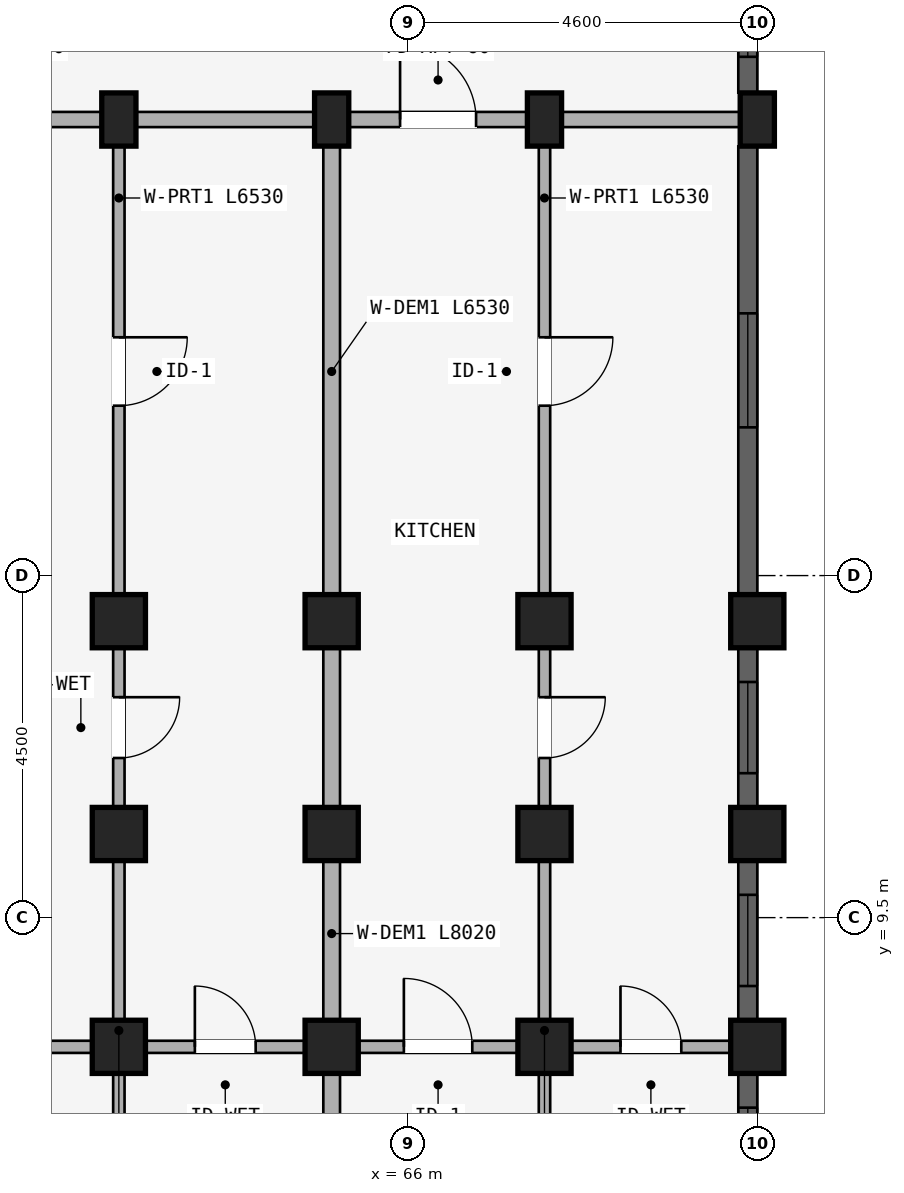
"""IFC4 building model, lengths in metres.
Left out: names, types, materials, properties, quantities, classifications, styles, units other than length and angle.
Written with IfcOpenShell. Run it as: python <this file> out.ifc"""

import sys

from ifc_helpers import new_model, si_unit, direction, frame, frame_2d, origin, origin_2d, place, context, subcontext, project, spatial, rectangle, extrude, element, fill, save


model = new_model("IFC4")
c1 = context("Model", 3, precision=1e-05, world=origin(), true_north=direction((0.0, 1.0)))
c2 = subcontext(c1, "Body", "Model", "MODEL_VIEW")
j1 = project(units=[si_unit("LENGTHUNIT", "METRE"), si_unit("PLANEANGLEUNIT", "RADIAN")], contexts=[c1])
p1 = place(None, origin())
s1 = spatial("IfcSite", under=j1, at=p1, CompositionType="ELEMENT")
p2 = place(p1, origin())
s2 = spatial("IfcBuilding", under=s1, at=p2, CompositionType="ELEMENT")
p3 = place(p2, frame((0.0, 0.0, 21.3)))
s3 = spatial("IfcBuildingStorey", under=s2, at=p3, CompositionType="ELEMENT", Elevation=21.3)
p4 = place(p3, frame((62.2, 20.0, 0.0), z_axis=(0.0, 0.0, 1.0), x_axis=(1.0, 0.0, 0.0)))
e1 = element("IfcColumn", 1, at=p4, inside=s3, PredefinedType="COLUMN", context=c2, shape_type="SweptSolid", body=[
    extrude(rectangle(XDim=0.45, YDim=0.7, at=origin_2d()), origin(), (0.0, 0.0, 1.0), 2.93),
])
for number, where, z_axis, x_axis in (
    (2, (62.2, 13.4, 0.0), (0.0, 0.0, 1.0), (1.0, 0.0, 0.0)),
    (3, (62.2, 10.6, 0.0), (0.0, 0.0, 1.0), (1.0, 0.0, 0.0)),
    (4, (62.2, 7.8, 0.0), (0.0, 0.0, 1.0), (1.0, 0.0, 0.0)),
):
    element("IfcColumn", number, at=place(p3, frame(where, z_axis=z_axis, x_axis=x_axis)), inside=s3, PredefinedType="COLUMN", context=c2, shape_type="SweptSolid", body=[
        extrude(rectangle(XDim=0.7, YDim=0.7, at=origin_2d()), origin(), (0.0, 0.0, 1.0), 2.93),
    ])
p5 = place(p3, frame((65.0, 20.0, 0.0), z_axis=(0.0, 0.0, 1.0), x_axis=(1.0, 0.0, 0.0)))
e5 = element("IfcColumn", 5, at=p5, inside=s3, PredefinedType="COLUMN", context=c2, shape_type="SweptSolid", body=[
    extrude(rectangle(XDim=0.45, YDim=0.7, at=origin_2d()), origin(), (0.0, 0.0, 1.0), 2.93),
])
for number, where, z_axis, x_axis in (
    (6, (65.0, 13.4, 0.0), (0.0, 0.0, 1.0), (1.0, 0.0, 0.0)),
    (7, (65.0, 10.6, 0.0), (0.0, 0.0, 1.0), (1.0, 0.0, 0.0)),
    (8, (65.0, 7.8, 0.0), (0.0, 0.0, 1.0), (1.0, 0.0, 0.0)),
):
    element("IfcColumn", number, at=place(p3, frame(where, z_axis=z_axis, x_axis=x_axis)), inside=s3, PredefinedType="COLUMN", context=c2, shape_type="SweptSolid", body=[
        extrude(rectangle(XDim=0.7, YDim=0.7, at=origin_2d()), origin(), (0.0, 0.0, 1.0), 2.93),
    ])
p6 = place(p3, frame((67.8, 20.0, 0.0), z_axis=(0.0, 0.0, 1.0), x_axis=(1.0, 0.0, 0.0)))
e9 = element("IfcColumn", 9, at=p6, inside=s3, PredefinedType="COLUMN", context=c2, shape_type="SweptSolid", body=[
    extrude(rectangle(XDim=0.45, YDim=0.7, at=origin_2d()), origin(), (0.0, 0.0, 1.0), 2.93),
])
for number, where, z_axis, x_axis in (
    (10, (67.8, 13.4, 0.0), (0.0, 0.0, 1.0), (1.0, 0.0, 0.0)),
    (11, (67.8, 10.6, 0.0), (0.0, 0.0, 1.0), (1.0, 0.0, 0.0)),
    (12, (67.8, 7.8, 0.0), (0.0, 0.0, 1.0), (1.0, 0.0, 0.0)),
):
    element("IfcColumn", number, at=place(p3, frame(where, z_axis=z_axis, x_axis=x_axis)), inside=s3, PredefinedType="COLUMN", context=c2, shape_type="SweptSolid", body=[
        extrude(rectangle(XDim=0.7, YDim=0.7, at=origin_2d()), origin(), (0.0, 0.0, 1.0), 2.93),
    ])
p7 = place(p3, frame((70.6, 20.0, 0.0), z_axis=(0.0, 0.0, 1.0), x_axis=(1.0, 0.0, 0.0)))
e13 = element("IfcColumn", 13, at=p7, inside=s3, PredefinedType="COLUMN", context=c2, shape_type="SweptSolid", body=[
    extrude(rectangle(XDim=0.45, YDim=0.7, at=origin_2d()), origin(), (0.0, 0.0, 1.0), 2.93),
])
for number, where, z_axis, x_axis in (
    (14, (70.6, 13.4, 0.0), (0.0, 0.0, 1.0), (1.0, 0.0, 0.0)),
    (15, (70.6, 10.6, 0.0), (0.0, 0.0, 1.0), (1.0, 0.0, 0.0)),
    (16, (70.6, 7.8, 0.0), (0.0, 0.0, 1.0), (1.0, 0.0, 0.0)),
):
    element("IfcColumn", number, at=place(p3, frame(where, z_axis=z_axis, x_axis=x_axis)), inside=s3, PredefinedType="COLUMN", context=c2, shape_type="SweptSolid", body=[
        extrude(rectangle(XDim=0.7, YDim=0.7, at=origin_2d()), origin(), (0.0, 0.0, 1.0), 2.93),
    ])
p8 = place(p3, frame((59.4, 20.0, 0.0), z_axis=(0.0, 0.0, 1.0), x_axis=(1.0, 0.0, 0.0)))
e17 = element("IfcWall", 17, at=p8, inside=s3, PredefinedType="STANDARD", context=c2, shape_type="SweptSolid", body=[
    extrude(rectangle(XDim=2.8, YDim=0.2, at=frame_2d((1.4, 0.0))), origin(), (0.0, 0.0, 1.0), 2.372),
])
p9 = place(p8, frame((0.9, 0.0, 0.0)))
e18 = element("IfcOpeningElement", 18, at=p9, cuts=e17, PredefinedType="OPENING", context=c2, shape_type="SweptSolid", body=[
    extrude(rectangle(XDim=1.0, YDim=2.15, at=frame_2d((0.5, 1.075))), frame((0.0, 0.11, 0.0), z_axis=(0.0, -1.0, 0.0), x_axis=(1.0, 0.0, 0.0)), (0.0, 0.0, 1.0), 0.22),
])
p10 = place(p3, frame((59.48, 7.8, 0.0), z_axis=(0.0, 0.0, 1.0), x_axis=(1.0, 0.0, 0.0)))
e19 = element("IfcWall", 19, at=p10, inside=s3, PredefinedType="PLUMBINGWALL", context=c2, shape_type="SweptSolid", body=[
    extrude(rectangle(XDim=2.64, YDim=0.16, at=frame_2d((1.32, 0.0))), origin(), (0.0, 0.0, 1.0), 2.372),
])
p11 = place(p10, frame((0.87, 0.0, 0.0)))
e20 = element("IfcOpeningElement", 20, at=p11, cuts=e19, PredefinedType="OPENING", context=c2, shape_type="SweptSolid", body=[
    extrude(rectangle(XDim=0.9, YDim=2.1, at=frame_2d((0.45, 1.05))), frame((0.0, 0.09, 0.0), z_axis=(0.0, -1.0, 0.0), x_axis=(1.0, 0.0, 0.0)), (0.0, 0.0, 1.0), 0.18),
])
p12 = place(p3, frame((62.2, 20.0, 0.0), z_axis=(0.0, 0.0, 1.0), x_axis=(1.0, 0.0, 0.0)))
e21 = element("IfcWall", 21, at=p12, inside=s3, PredefinedType="STANDARD", context=c2, shape_type="SweptSolid", body=[
    extrude(rectangle(XDim=2.8, YDim=0.2, at=frame_2d((1.4, 0.0))), origin(), (0.0, 0.0, 1.0), 2.372),
])
p13 = place(p3, frame((62.28, 7.8, 0.0), z_axis=(0.0, 0.0, 1.0), x_axis=(1.0, 0.0, 0.0)))
e22 = element("IfcWall", 22, at=p13, inside=s3, PredefinedType="PLUMBINGWALL", context=c2, shape_type="SweptSolid", body=[
    extrude(rectangle(XDim=2.64, YDim=0.16, at=frame_2d((1.32, 0.0))), origin(), (0.0, 0.0, 1.0), 2.372),
])
p14 = place(p13, frame((0.92, 0.0, 0.0)))
e23 = element("IfcOpeningElement", 23, at=p14, cuts=e22, PredefinedType="OPENING", context=c2, shape_type="SweptSolid", body=[
    extrude(rectangle(XDim=0.8, YDim=2.1, at=frame_2d((0.4, 1.05))), frame((0.0, 0.09, 0.0), z_axis=(0.0, -1.0, 0.0), x_axis=(1.0, 0.0, 0.0)), (0.0, 0.0, 1.0), 0.18),
])
p15 = place(p3, frame((65.0, 20.0, 0.0), z_axis=(0.0, 0.0, 1.0), x_axis=(1.0, 0.0, 0.0)))
e24 = element("IfcWall", 24, at=p15, inside=s3, PredefinedType="STANDARD", context=c2, shape_type="SweptSolid", body=[
    extrude(rectangle(XDim=2.8, YDim=0.2, at=frame_2d((1.4, 0.0))), origin(), (0.0, 0.0, 1.0), 2.372),
])
p16 = place(p15, frame((0.9, 0.0, 0.0)))
e25 = element("IfcOpeningElement", 25, at=p16, cuts=e24, PredefinedType="OPENING", context=c2, shape_type="SweptSolid", body=[
    extrude(rectangle(XDim=1.0, YDim=2.15, at=frame_2d((0.5, 1.075))), frame((0.0, 0.11, 0.0), z_axis=(0.0, -1.0, 0.0), x_axis=(1.0, 0.0, 0.0)), (0.0, 0.0, 1.0), 0.22),
])
p17 = place(p3, frame((65.08, 7.8, 0.0), z_axis=(0.0, 0.0, 1.0), x_axis=(1.0, 0.0, 0.0)))
e26 = element("IfcWall", 26, at=p17, inside=s3, PredefinedType="PLUMBINGWALL", context=c2, shape_type="SweptSolid", body=[
    extrude(rectangle(XDim=2.64, YDim=0.16, at=frame_2d((1.32, 0.0))), origin(), (0.0, 0.0, 1.0), 2.372),
])
p18 = place(p17, frame((0.87, 0.0, 0.0)))
e27 = element("IfcOpeningElement", 27, at=p18, cuts=e26, PredefinedType="OPENING", context=c2, shape_type="SweptSolid", body=[
    extrude(rectangle(XDim=0.9, YDim=2.1, at=frame_2d((0.45, 1.05))), frame((0.0, 0.09, 0.0), z_axis=(0.0, -1.0, 0.0), x_axis=(1.0, 0.0, 0.0)), (0.0, 0.0, 1.0), 0.18),
])
p19 = place(p3, frame((67.8, 20.0, 0.0), z_axis=(0.0, 0.0, 1.0), x_axis=(1.0, 0.0, 0.0)))
e28 = element("IfcWall", 28, at=p19, inside=s3, PredefinedType="STANDARD", context=c2, shape_type="SweptSolid", body=[
    extrude(rectangle(XDim=2.8, YDim=0.2, at=frame_2d((1.4, 0.0))), origin(), (0.0, 0.0, 1.0), 2.372),
])
p20 = place(p3, frame((67.88, 7.8, 0.0), z_axis=(0.0, 0.0, 1.0), x_axis=(1.0, 0.0, 0.0)))
e29 = element("IfcWall", 29, at=p20, inside=s3, PredefinedType="PLUMBINGWALL", context=c2, shape_type="SweptSolid", body=[
    extrude(rectangle(XDim=2.64, YDim=0.16, at=frame_2d((1.32, 0.0))), origin(), (0.0, 0.0, 1.0), 2.372),
])
p21 = place(p20, frame((0.92, 0.0, 0.0)))
e30 = element("IfcOpeningElement", 30, at=p21, cuts=e29, PredefinedType="OPENING", context=c2, shape_type="SweptSolid", body=[
    extrude(rectangle(XDim=0.8, YDim=2.1, at=frame_2d((0.4, 1.05))), frame((0.0, 0.09, 0.0), z_axis=(0.0, -1.0, 0.0), x_axis=(1.0, 0.0, 0.0)), (0.0, 0.0, 1.0), 0.18),
])
p22 = place(p3, frame((62.2, 19.95, 0.0), z_axis=(0.0, 0.0, 1.0), x_axis=(0.0, -1.0, 0.0)))
e31 = element("IfcWall", 31, at=p22, inside=s3, PredefinedType="PARTITIONING", context=c2, shape_type="SweptSolid", body=[
    extrude(rectangle(XDim=6.53, YDim=0.15, at=frame_2d((3.265, 0.0))), origin(), (0.0, 0.0, 1.0), 2.372),
])
p23 = place(p22, frame((2.815, 0.0, 0.0)))
e32 = element("IfcOpeningElement", 32, at=p23, cuts=e31, PredefinedType="OPENING", context=c2, shape_type="SweptSolid", body=[
    extrude(rectangle(XDim=0.9, YDim=2.1, at=frame_2d((0.45, 1.05))), frame((0.0, 0.085, 0.0), z_axis=(0.0, -1.0, 0.0), x_axis=(1.0, 0.0, 0.0)), (0.0, 0.0, 1.0), 0.17),
])
p24 = place(p3, frame((62.2, 13.3, 0.0), z_axis=(0.0, 0.0, 1.0), x_axis=(0.0, -1.0, 0.0)))
e33 = element("IfcWall", 33, at=p24, inside=s3, PredefinedType="PARTITIONING", context=c2, shape_type="SweptSolid", body=[
    extrude(rectangle(XDim=8.02, YDim=0.15, at=frame_2d((4.01, 0.0))), origin(), (0.0, 0.0, 1.0), 2.372),
])
p25 = place(p24, frame((0.9, 0.0, 0.0)))
e34 = element("IfcOpeningElement", 34, at=p25, cuts=e33, PredefinedType="OPENING", context=c2, shape_type="SweptSolid", body=[
    extrude(rectangle(XDim=0.8, YDim=2.1, at=frame_2d((0.4, 1.05))), frame((0.0, 0.085, 0.0), z_axis=(0.0, -1.0, 0.0), x_axis=(1.0, 0.0, 0.0)), (0.0, 0.0, 1.0), 0.17),
])
p26 = place(p3, frame((65.0, 19.95, 0.0), z_axis=(0.0, 0.0, 1.0), x_axis=(0.0, -1.0, 0.0)))
e35 = element("IfcWall", 35, at=p26, inside=s3, PredefinedType="STANDARD", context=c2, shape_type="SweptSolid", body=[
    extrude(rectangle(XDim=6.53, YDim=0.22, at=frame_2d((3.265, 0.0))), origin(), (0.0, 0.0, 1.0), 2.372),
])
p27 = place(p3, frame((65.0, 13.3, 0.0), z_axis=(0.0, 0.0, 1.0), x_axis=(0.0, -1.0, 0.0)))
e36 = element("IfcWall", 36, at=p27, inside=s3, PredefinedType="STANDARD", context=c2, shape_type="SweptSolid", body=[
    extrude(rectangle(XDim=8.02, YDim=0.22, at=frame_2d((4.01, 0.0))), origin(), (0.0, 0.0, 1.0), 2.372),
])
p28 = place(p3, frame((67.8, 19.95, 0.0), z_axis=(0.0, 0.0, 1.0), x_axis=(0.0, -1.0, 0.0)))
e37 = element("IfcWall", 37, at=p28, inside=s3, PredefinedType="PARTITIONING", context=c2, shape_type="SweptSolid", body=[
    extrude(rectangle(XDim=6.53, YDim=0.15, at=frame_2d((3.265, 0.0))), origin(), (0.0, 0.0, 1.0), 2.372),
])
p29 = place(p28, frame((2.815, 0.0, 0.0)))
e38 = element("IfcOpeningElement", 38, at=p29, cuts=e37, PredefinedType="OPENING", context=c2, shape_type="SweptSolid", body=[
    extrude(rectangle(XDim=0.9, YDim=2.1, at=frame_2d((0.45, 1.05))), frame((0.0, 0.085, 0.0), z_axis=(0.0, -1.0, 0.0), x_axis=(1.0, 0.0, 0.0)), (0.0, 0.0, 1.0), 0.17),
])
p30 = place(p3, frame((67.8, 13.3, 0.0), z_axis=(0.0, 0.0, 1.0), x_axis=(0.0, -1.0, 0.0)))
e39 = element("IfcWall", 39, at=p30, inside=s3, PredefinedType="PARTITIONING", context=c2, shape_type="SweptSolid", body=[
    extrude(rectangle(XDim=8.02, YDim=0.15, at=frame_2d((4.01, 0.0))), origin(), (0.0, 0.0, 1.0), 2.372),
])
p31 = place(p30, frame((0.9, 0.0, 0.0)))
e40 = element("IfcOpeningElement", 40, at=p31, cuts=e39, PredefinedType="OPENING", context=c2, shape_type="SweptSolid", body=[
    extrude(rectangle(XDim=0.8, YDim=2.1, at=frame_2d((0.4, 1.05))), frame((0.0, 0.085, 0.0), z_axis=(0.0, -1.0, 0.0), x_axis=(1.0, 0.0, 0.0)), (0.0, 0.0, 1.0), 0.17),
])
p32 = place(p3, frame((70.475, 22.046, 0.0), z_axis=(0.0, 0.0, 1.0), x_axis=(0.0, -1.0, 0.0)))
e41 = element("IfcWall", 41, at=p32, inside=s3, PredefinedType="STANDARD", context=c2, shape_type="SweptSolid", body=[
    extrude(rectangle(XDim=1.693, YDim=0.25, at=frame_2d((0.846, 0.0))), origin(), (0.0, 0.0, 1.0), 2.372),
])
p33 = place(p32, frame((0.471, 0.0, 0.88)))
e42 = element("IfcOpeningElement", 42, at=p33, cuts=e41, PredefinedType="OPENING", context=c2, shape_type="SweptSolid", body=[
    extrude(rectangle(XDim=0.75, YDim=1.05, at=frame_2d((0.375, 0.525))), frame((0.0, 0.135, 0.0), z_axis=(0.0, -1.0, 0.0), x_axis=(1.0, 0.0, 0.0)), (0.0, 0.0, 1.0), 0.27),
])
p34 = place(p3, frame((70.475, 19.646, 0.0), z_axis=(0.0, 0.0, 1.0), x_axis=(0.0, -1.0, 0.0)))
e43 = element("IfcWall", 43, at=p34, inside=s3, PredefinedType="STANDARD", context=c2, shape_type="SweptSolid", body=[
    extrude(rectangle(XDim=5.893, YDim=0.25, at=frame_2d((2.947, 0.0))), origin(), (0.0, 0.0, 1.0), 2.372),
])
p35 = place(p34, frame((2.197, 0.0, 0.522)))
e44 = element("IfcOpeningElement", 44, at=p35, cuts=e43, PredefinedType="OPENING", context=c2, shape_type="SweptSolid", body=[
    extrude(rectangle(XDim=1.5, YDim=1.65, at=frame_2d((0.75, 0.825))), frame((0.0, 0.135, 0.0), z_axis=(0.0, -1.0, 0.0), x_axis=(1.0, 0.0, 0.0)), (0.0, 0.0, 1.0), 0.27),
])
p36 = place(p3, frame((70.475, 13.046, 0.0), z_axis=(0.0, 0.0, 1.0), x_axis=(0.0, -1.0, 0.0)))
e45 = element("IfcWall", 45, at=p36, inside=s3, PredefinedType="STANDARD", context=c2, shape_type="SweptSolid", body=[
    extrude(rectangle(XDim=2.093, YDim=0.25, at=frame_2d((1.046, 0.0))), origin(), (0.0, 0.0, 1.0), 2.372),
])
p37 = place(p36, frame((0.447, 0.0, 0.672)))
e46 = element("IfcOpeningElement", 46, at=p37, cuts=e45, PredefinedType="OPENING", context=c2, shape_type="SweptSolid", body=[
    extrude(rectangle(XDim=1.2, YDim=1.5, at=frame_2d((0.6, 0.75))), frame((0.0, 0.135, 0.0), z_axis=(0.0, -1.0, 0.0), x_axis=(1.0, 0.0, 0.0)), (0.0, 0.0, 1.0), 0.27),
])
p38 = place(p3, frame((70.475, 10.247, 0.0), z_axis=(0.0, 0.0, 1.0), x_axis=(0.0, -1.0, 0.0)))
e47 = element("IfcWall", 47, at=p38, inside=s3, PredefinedType="STANDARD", context=c2, shape_type="SweptSolid", body=[
    extrude(rectangle(XDim=2.093, YDim=0.25, at=frame_2d((1.046, 0.0))), origin(), (0.0, 0.0, 1.0), 2.372),
])
p39 = place(p38, frame((0.447, 0.0, 0.672)))
e48 = element("IfcOpeningElement", 48, at=p39, cuts=e47, PredefinedType="OPENING", context=c2, shape_type="SweptSolid", body=[
    extrude(rectangle(XDim=1.2, YDim=1.5, at=frame_2d((0.6, 0.75))), frame((0.0, 0.135, 0.0), z_axis=(0.0, -1.0, 0.0), x_axis=(1.0, 0.0, 0.0)), (0.0, 0.0, 1.0), 0.27),
])
p40 = place(p3, frame((70.475, 7.447, 0.0), z_axis=(0.0, 0.0, 1.0), x_axis=(0.0, -1.0, 0.0)))
e49 = element("IfcWall", 49, at=p40, inside=s3, PredefinedType="STANDARD", context=c2, shape_type="SweptSolid", body=[
    extrude(rectangle(XDim=2.093, YDim=0.25, at=frame_2d((1.046, 0.0))), origin(), (0.0, 0.0, 1.0), 2.412),
])
p41 = place(p40, frame((0.447, 0.0, 0.712)))
e50 = element("IfcOpeningElement", 50, at=p41, cuts=e49, PredefinedType="OPENING", context=c2, shape_type="SweptSolid", body=[
    extrude(rectangle(XDim=1.2, YDim=1.5, at=frame_2d((0.6, 0.75))), frame((0.0, 0.135, 0.0), z_axis=(0.0, -1.0, 0.0), x_axis=(1.0, 0.0, 0.0)), (0.0, 0.0, 1.0), 0.27),
])
p42 = place(p33, origin())
e51 = element("IfcWindow", 51, at=p42, inside=s3, PartitioningType="SINGLE_PANEL", PredefinedType="WINDOW", context=c2, shape_type="SweptSolid", body=[
    extrude(rectangle(XDim=0.75, YDim=1.05, at=frame_2d((0.375, 0.525))), frame((0.0, 0.03, 0.0), z_axis=(0.0, -1.0, 0.0), x_axis=(1.0, 0.0, 0.0)), (0.0, 0.0, 1.0), 0.06),
])
fill(e42, e51)
p43 = place(p35, origin())
e52 = element("IfcWindow", 52, at=p43, inside=s3, PartitioningType="DOUBLE_PANEL_VERTICAL", PredefinedType="WINDOW", context=c2, shape_type="SweptSolid", body=[
    extrude(rectangle(XDim=1.5, YDim=1.65, at=frame_2d((0.75, 0.825))), frame((0.0, 0.03, 0.0), z_axis=(0.0, -1.0, 0.0), x_axis=(1.0, 0.0, 0.0)), (0.0, 0.0, 1.0), 0.06),
])
fill(e44, e52)
p44 = place(p37, origin())
e53 = element("IfcWindow", 53, at=p44, inside=s3, PartitioningType="SINGLE_PANEL", PredefinedType="WINDOW", context=c2, shape_type="SweptSolid", body=[
    extrude(rectangle(XDim=1.2, YDim=1.5, at=frame_2d((0.6, 0.75))), frame((0.0, 0.03, 0.0), z_axis=(0.0, -1.0, 0.0), x_axis=(1.0, 0.0, 0.0)), (0.0, 0.0, 1.0), 0.06),
])
fill(e46, e53)
p45 = place(p39, origin())
e54 = element("IfcWindow", 54, at=p45, inside=s3, PartitioningType="SINGLE_PANEL", PredefinedType="WINDOW", context=c2, shape_type="SweptSolid", body=[
    extrude(rectangle(XDim=1.2, YDim=1.5, at=frame_2d((0.6, 0.75))), frame((0.0, 0.03, 0.0), z_axis=(0.0, -1.0, 0.0), x_axis=(1.0, 0.0, 0.0)), (0.0, 0.0, 1.0), 0.06),
])
fill(e48, e54)
p46 = place(p41, origin())
e55 = element("IfcWindow", 55, at=p46, inside=s3, PartitioningType="SINGLE_PANEL", PredefinedType="WINDOW", context=c2, shape_type="SweptSolid", body=[
    extrude(rectangle(XDim=1.2, YDim=1.5, at=frame_2d((0.6, 0.75))), frame((0.0, 0.03, 0.0), z_axis=(0.0, -1.0, 0.0), x_axis=(1.0, 0.0, 0.0)), (0.0, 0.0, 1.0), 0.06),
])
fill(e50, e55)
p47 = place(p14, origin())
e56 = element("IfcDoor", 56, at=p47, inside=s3, OperationType="SINGLE_SWING_LEFT", PredefinedType="DOOR", context=c2, shape_type="SweptSolid", body=[
    extrude(rectangle(XDim=0.8, YDim=2.1, at=frame_2d((0.4, 1.05))), frame((0.0, 0.025, 0.0), z_axis=(0.0, -1.0, 0.0), x_axis=(1.0, 0.0, 0.0)), (0.0, 0.0, 1.0), 0.05),
])
fill(e23, e56)
p48 = place(p18, origin())
e57 = element("IfcDoor", 57, at=p48, inside=s3, OperationType="SINGLE_SWING_LEFT", PredefinedType="DOOR", context=c2, shape_type="SweptSolid", body=[
    extrude(rectangle(XDim=0.9, YDim=2.1, at=frame_2d((0.45, 1.05))), frame((0.0, 0.025, 0.0), z_axis=(0.0, -1.0, 0.0), x_axis=(1.0, 0.0, 0.0)), (0.0, 0.0, 1.0), 0.05),
])
fill(e27, e57)
p49 = place(p16, frame((1.0, 0.0, 0.0), z_axis=(0.0, 0.0, 1.0), x_axis=(-1.0, 0.0, 0.0)))
e58 = element("IfcDoor", 58, at=p49, inside=s3, OperationType="SINGLE_SWING_RIGHT", PredefinedType="DOOR", context=c2, shape_type="SweptSolid", body=[
    extrude(rectangle(XDim=1.0, YDim=2.15, at=frame_2d((0.5, 1.075))), frame((0.0, 0.025, 0.0), z_axis=(0.0, -1.0, 0.0), x_axis=(1.0, 0.0, 0.0)), (0.0, 0.0, 1.0), 0.05),
])
fill(e25, e58)
p50 = place(p21, origin())
e59 = element("IfcDoor", 59, at=p50, inside=s3, OperationType="SINGLE_SWING_LEFT", PredefinedType="DOOR", context=c2, shape_type="SweptSolid", body=[
    extrude(rectangle(XDim=0.8, YDim=2.1, at=frame_2d((0.4, 1.05))), frame((0.0, 0.025, 0.0), z_axis=(0.0, -1.0, 0.0), x_axis=(1.0, 0.0, 0.0)), (0.0, 0.0, 1.0), 0.05),
])
fill(e30, e59)
p51 = place(p23, frame((0.9, 0.0, 0.0), z_axis=(0.0, 0.0, 1.0), x_axis=(-1.0, 0.0, 0.0)))
e60 = element("IfcDoor", 60, at=p51, inside=s3, OperationType="SINGLE_SWING_RIGHT", PredefinedType="DOOR", context=c2, shape_type="SweptSolid", body=[
    extrude(rectangle(XDim=0.9, YDim=2.1, at=frame_2d((0.45, 1.05))), frame((0.0, 0.025, 0.0), z_axis=(0.0, -1.0, 0.0), x_axis=(1.0, 0.0, 0.0)), (0.0, 0.0, 1.0), 0.05),
])
fill(e32, e60)
p52 = place(p25, origin())
e61 = element("IfcDoor", 61, at=p52, inside=s3, OperationType="SINGLE_SWING_LEFT", PredefinedType="DOOR", context=c2, shape_type="SweptSolid", body=[
    extrude(rectangle(XDim=0.8, YDim=2.1, at=frame_2d((0.4, 1.05))), frame((0.0, 0.025, 0.0), z_axis=(0.0, -1.0, 0.0), x_axis=(1.0, 0.0, 0.0)), (0.0, 0.0, 1.0), 0.05),
])
fill(e34, e61)
p53 = place(p29, origin())
e62 = element("IfcDoor", 62, at=p53, inside=s3, OperationType="SINGLE_SWING_LEFT", PredefinedType="DOOR", context=c2, shape_type="SweptSolid", body=[
    extrude(rectangle(XDim=0.9, YDim=2.1, at=frame_2d((0.45, 1.05))), frame((0.0, 0.025, 0.0), z_axis=(0.0, -1.0, 0.0), x_axis=(1.0, 0.0, 0.0)), (0.0, 0.0, 1.0), 0.05),
])
fill(e38, e62)
p54 = place(p31, frame((0.8, 0.0, 0.0), z_axis=(0.0, 0.0, 1.0), x_axis=(-1.0, 0.0, 0.0)))
e63 = element("IfcDoor", 63, at=p54, inside=s3, OperationType="SINGLE_SWING_RIGHT", PredefinedType="DOOR", context=c2, shape_type="SweptSolid", body=[
    extrude(rectangle(XDim=0.8, YDim=2.1, at=frame_2d((0.4, 1.05))), frame((0.0, 0.025, 0.0), z_axis=(0.0, -1.0, 0.0), x_axis=(1.0, 0.0, 0.0)), (0.0, 0.0, 1.0), 0.05),
])
fill(e40, e63)
save(model, sys.argv[1])
